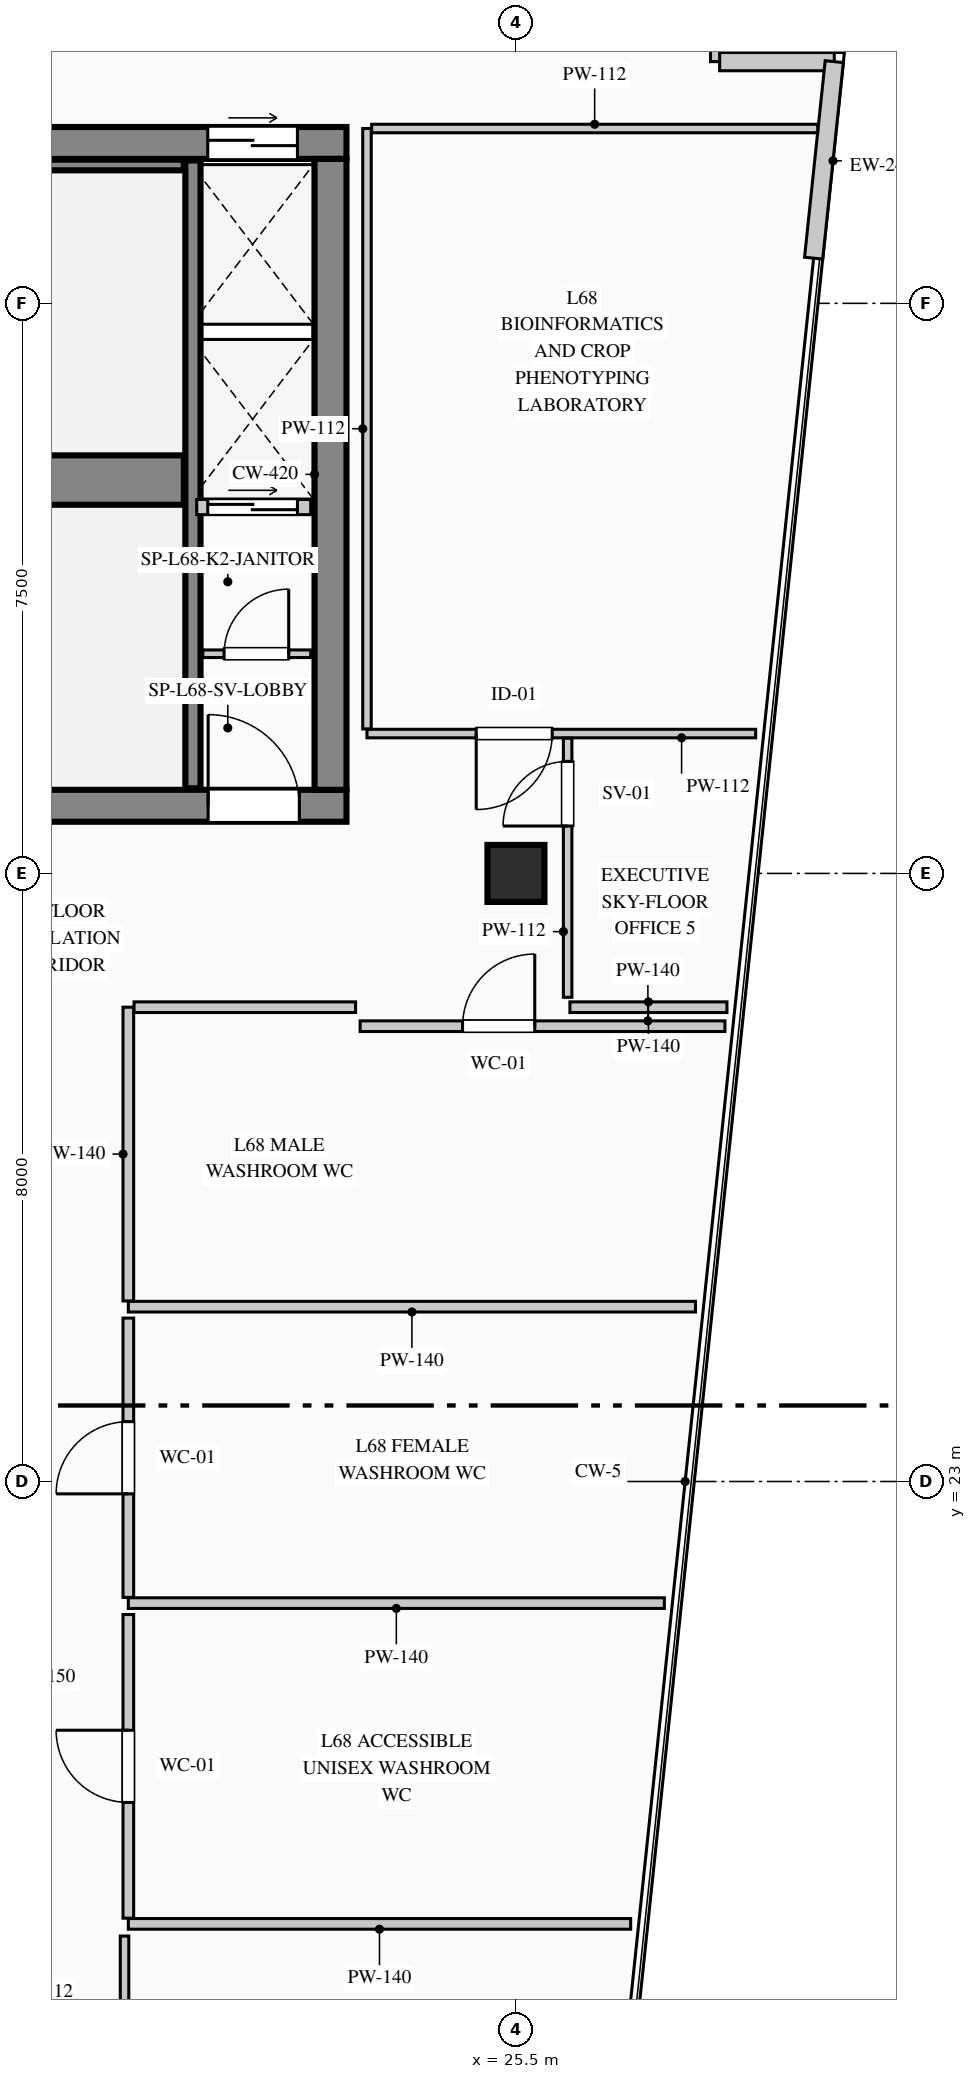
"""IFC4 building model, lengths in metres.
Left out: names, types, materials, properties, quantities, classifications, styles, units other than length and angle.
Written with IfcOpenShell. Run it as: python <this file> out.ifc"""

import sys

from ifc_helpers import new_model, si_unit, direction, frame, frame_2d, origin, origin_2d, place, context, subcontext, project, spatial, rectangle, extrude, element, fill, save


model = new_model("IFC4")
c1 = context("Model", 3, precision=1e-05, world=origin(), true_north=direction((0.0, 1.0)))
c2 = subcontext(c1, "Body", "Model", "MODEL_VIEW")
j1 = project(units=[si_unit("LENGTHUNIT", "METRE"), si_unit("PLANEANGLEUNIT", "RADIAN")], contexts=[c1])
p1 = place(None, origin())
s1 = spatial("IfcSite", under=j1, at=p1, CompositionType="ELEMENT")
p2 = place(p1, origin())
s2 = spatial("IfcBuilding", under=s1, at=p2, CompositionType="ELEMENT")
p3 = place(p2, frame((0.0, 0.0, 284.35)))
s3 = spatial("IfcBuildingStorey", under=s2, at=p3, CompositionType="ELEMENT", Elevation=284.35)
p4 = place(p3, frame((5.58, 40.61, 0.0), z_axis=(0.0, 0.0, 1.0), x_axis=(1.0, 0.0, 0.0)))
e1 = element("IfcWall", 1, at=p4, inside=s3, PredefinedType="SHEAR", context=c2, shape_type="SweptSolid", body=[
    extrude(rectangle(XDim=17.69, YDim=0.42, at=frame_2d((8.845, 0.0))), origin(), (0.0, 0.0, 1.0), 3.95),
])
p5 = place(p4, frame((15.865, 0.0, 0.0)))
e2 = element("IfcOpeningElement", 2, at=p5, cuts=e1, PredefinedType="OPENING", context=c2, shape_type="SweptSolid", body=[
    extrude(rectangle(XDim=1.18, YDim=2.25, at=frame_2d((0.59, 1.125))), frame((0.0, 0.22, 0.0), z_axis=(0.0, -1.0, 0.0), x_axis=(1.0, 0.0, 0.0)), (0.0, 0.0, 1.0), 0.44),
])
p6 = place(p3, frame((5.58, 31.89, 0.0), z_axis=(0.0, 0.0, 1.0), x_axis=(1.0, 0.0, 0.0)))
e3 = element("IfcWall", 3, at=p6, inside=s3, PredefinedType="SHEAR", context=c2, shape_type="SweptSolid", body=[
    extrude(rectangle(XDim=17.69, YDim=0.42, at=frame_2d((8.845, 0.0))), origin(), (0.0, 0.0, 1.0), 3.95),
])
p7 = place(p6, frame((3.07, 0.0, 0.0)))
e4 = element("IfcOpeningElement", 4, at=p7, cuts=e3, PredefinedType="OPENING", context=c2, shape_type="SweptSolid", body=[
    extrude(rectangle(XDim=1.2, YDim=2.2, at=frame_2d((0.6, 1.1))), frame((0.0, 0.22, 0.0), z_axis=(0.0, -1.0, 0.0), x_axis=(1.0, 0.0, 0.0)), (0.0, 0.0, 1.0), 0.44),
])
p8 = place(p6, frame((6.92, 0.0, 0.0)))
e5 = element("IfcOpeningElement", 5, at=p8, cuts=e3, PredefinedType="OPENING", context=c2, shape_type="SweptSolid", body=[
    extrude(rectangle(XDim=1.2, YDim=2.2, at=frame_2d((0.6, 1.1))), frame((0.0, 0.22, 0.0), z_axis=(0.0, -1.0, 0.0), x_axis=(1.0, 0.0, 0.0)), (0.0, 0.0, 1.0), 0.44),
])
p9 = place(p6, frame((8.77, 0.0, 0.0)))
e6 = element("IfcOpeningElement", 6, at=p9, cuts=e3, PredefinedType="OPENING", context=c2, shape_type="SweptSolid", body=[
    extrude(rectangle(XDim=1.15, YDim=2.2, at=frame_2d((0.575, 1.1))), frame((0.0, 0.22, 0.0), z_axis=(0.0, -1.0, 0.0), x_axis=(1.0, 0.0, 0.0)), (0.0, 0.0, 1.0), 0.44),
])
p10 = place(p6, frame((15.87, 0.0, 0.0)))
e7 = element("IfcOpeningElement", 7, at=p10, cuts=e3, PredefinedType="OPENING", context=c2, shape_type="SweptSolid", body=[
    extrude(rectangle(XDim=1.2, YDim=2.2, at=frame_2d((0.6, 1.1))), frame((0.0, 0.22, 0.0), z_axis=(0.0, -1.0, 0.0), x_axis=(1.0, 0.0, 0.0)), (0.0, 0.0, 1.0), 0.44),
])
p11 = place(p3, frame((23.06, 32.1, 0.0), z_axis=(0.0, 0.0, 1.0), x_axis=(0.0, 1.0, 0.0)))
e8 = element("IfcWall", 8, at=p11, inside=s3, PredefinedType="SHEAR", context=c2, shape_type="SweptSolid", body=[
    extrude(rectangle(XDim=8.3, YDim=0.42, at=frame_2d((4.15, 0.0))), origin(), (0.0, 0.0, 1.0), 3.95),
])
p12 = place(p3, frame((14.12, 36.175, 0.0), z_axis=(0.0, 0.0, 1.0), x_axis=(1.0, 0.0, 0.0)))
e9 = element("IfcWall", 9, at=p12, inside=s3, PredefinedType="SHEAR", context=c2, shape_type="SweptSolid", body=[
    extrude(rectangle(XDim=7.01, YDim=0.65, at=frame_2d((3.505, 0.0))), origin(), (0.0, 0.0, 1.0), 3.95),
])
p13 = place(p3, frame((21.25, 32.12, 0.0), z_axis=(0.0, 0.0, 1.0), x_axis=(0.0, 1.0, 0.0)))
e10 = element("IfcWall", 10, at=p13, inside=s3, PredefinedType="SHEAR", context=c2, shape_type="SweptSolid", body=[
    extrude(rectangle(XDim=8.26, YDim=0.2, at=frame_2d((4.13, 0.0))), origin(), (0.0, 0.0, 1.0), 3.95),
])
p14 = place(p3, frame((14.12, 40.32, 0.0), z_axis=(0.0, 0.0, 1.0), x_axis=(1.0, 0.0, 0.0)))
e11 = element("IfcWall", 11, at=p14, inside=s3, PredefinedType="SHEAR", context=c2, shape_type="SweptSolid", body=[
    extrude(rectangle(XDim=7.01, YDim=0.14, at=frame_2d((3.505, 0.0))), origin(), (0.0, 0.0, 1.0), 3.95),
])
p15 = place(p3, frame((25.5, 31.0, 0.0), z_axis=(0.0, 0.0, 1.0), x_axis=(1.0, 0.0, 0.0)))
e12 = element("IfcColumn", 12, at=p15, inside=s3, PredefinedType="COLUMN", context=c2, shape_type="SweptSolid", body=[
    extrude(rectangle(XDim=0.75, YDim=0.75, at=origin_2d()), origin(), (0.0, 0.0, 1.0), 3.95),
])
p16 = place(p3, frame((28.18, 43.38, 0.0), z_axis=(0.0, 0.0, 1.0), x_axis=(0.0, -1.0, 0.0)))
e13 = element("IfcWall", 13, at=p16, inside=s3, PredefinedType="STANDARD", context=c2, shape_type="SweptSolid", body=[
    extrude(rectangle(XDim=1.7, YDim=0.24, at=frame_2d((0.85, 0.0))), origin(), (0.0, 0.0, 1.0), 3.7),
])
p17 = place(p3, frame((28.18, 41.68, 0.0), z_axis=(0.0, 0.0, 1.0), x_axis=(1.0, 0.0, 0.0)))
e14 = element("IfcWall", 14, at=p17, inside=s3, PredefinedType="STANDARD", context=c2, shape_type="SweptSolid", body=[
    extrude(rectangle(XDim=1.508, YDim=0.24, at=frame_2d((0.754, 0.0))), origin(), (0.0, 0.0, 1.0), 3.7),
])
p18 = place(p3, frame((29.688, 41.68, 0.0), z_axis=(0.0, 0.0, 1.0), x_axis=(-0.104420821624, -0.994533203071, 0.0)))
e15 = element("IfcWall", 15, at=p18, inside=s3, PredefinedType="STANDARD", context=c2, shape_type="SweptSolid", body=[
    extrude(rectangle(XDim=2.6, YDim=0.24, at=frame_2d((1.3, 0.0))), origin(), (0.0, 0.0, 1.0), 3.7),
])
p19 = place(p3, frame((21.38, 33.89, 0.0), z_axis=(0.0, 0.0, 1.0), x_axis=(1.0, 0.0, 0.0)))
e16 = element("IfcWall", 16, at=p19, inside=s3, PredefinedType="PARTITIONING", context=c2, shape_type="SweptSolid", body=[
    extrude(rectangle(XDim=1.42, YDim=0.1, at=frame_2d((0.71, 0.0))), origin(), (0.0, 0.0, 1.0), 3.7),
])
p20 = place(p19, frame((0.28, 0.0, 0.0)))
e17 = element("IfcOpeningElement", 17, at=p20, cuts=e16, PredefinedType="OPENING", context=c2, shape_type="SweptSolid", body=[
    extrude(rectangle(XDim=0.85, YDim=2.1, at=frame_2d((0.425, 1.05))), frame((0.0, 0.06, 0.0), z_axis=(0.0, -1.0, 0.0), x_axis=(1.0, 0.0, 0.0)), (0.0, 0.0, 1.0), 0.12),
])
p21 = place(p3, frame((21.3, 35.82, 0.0), z_axis=(0.0, 0.0, 1.0), x_axis=(1.0, 0.0, 0.0)))
e18 = element("IfcWall", 18, at=p21, inside=s3, PredefinedType="PARTITIONING", context=c2, shape_type="SweptSolid", body=[
    extrude(rectangle(XDim=1.5, YDim=0.2, at=frame_2d((0.75, 0.0))), origin(), (0.0, 0.0, 1.0), 3.7),
])
p22 = place(p21, frame((0.145, 0.0, 0.0)))
e19 = element("IfcOpeningElement", 19, at=p22, cuts=e18, PredefinedType="OPENING", context=c2, shape_type="SweptSolid", body=[
    extrude(rectangle(XDim=1.18, YDim=2.25, at=frame_2d((0.59, 1.125))), frame((0.0, 0.11, 0.0), z_axis=(0.0, -1.0, 0.0), x_axis=(1.0, 0.0, 0.0)), (0.0, 0.0, 1.0), 0.22),
])
p23 = place(p3, frame((28.654, 32.84, 0.0), z_axis=(0.0, 0.0, 1.0), x_axis=(-1.0, 0.0, 0.0)))
e20 = element("IfcWall", 20, at=p23, inside=s3, PredefinedType="PARTITIONING", context=c2, shape_type="SweptSolid", body=[
    extrude(rectangle(XDim=5.114, YDim=0.112, at=frame_2d((2.557, 0.0))), origin(), (0.0, 0.0, 1.0), 3.7),
])
p24 = place(p23, frame((2.677, 0.0, 0.0)))
e21 = element("IfcOpeningElement", 21, at=p24, cuts=e20, PredefinedType="OPENING", context=c2, shape_type="SweptSolid", body=[
    extrude(rectangle(XDim=1.0, YDim=2.15, at=frame_2d((0.5, 1.075))), frame((0.0, 0.066, 0.0), z_axis=(0.0, -1.0, 0.0), x_axis=(1.0, 0.0, 0.0)), (0.0, 0.0, 1.0), 0.132),
])
p25 = place(p3, frame((23.54, 32.901, 0.0), z_axis=(0.0, 0.0, 1.0), x_axis=(0.0, 1.0, 0.0)))
e22 = element("IfcWall", 22, at=p25, inside=s3, PredefinedType="PARTITIONING", context=c2, shape_type="SweptSolid", body=[
    extrude(rectangle(XDim=7.899, YDim=0.112, at=frame_2d((3.95, 0.0))), origin(), (0.0, 0.0, 1.0), 3.7),
])
p26 = place(p3, frame((23.601, 40.8, 0.0), z_axis=(0.0, 0.0, 1.0), x_axis=(1.0, 0.0, 0.0)))
e23 = element("IfcWall", 23, at=p26, inside=s3, PredefinedType="PARTITIONING", context=c2, shape_type="SweptSolid", body=[
    extrude(rectangle(XDim=5.869, YDim=0.112, at=frame_2d((2.935, 0.0))), origin(), (0.0, 0.0, 1.0), 3.7),
])
p27 = place(p3, frame((23.45, 28.99, 0.0), z_axis=(0.0, 0.0, 1.0), x_axis=(1.0, 0.0, 0.0)))
e24 = element("IfcWall", 24, at=p27, inside=s3, PredefinedType="PARTITIONING", context=c2, shape_type="SweptSolid", body=[
    extrude(rectangle(XDim=4.8, YDim=0.14, at=frame_2d((2.4, 0.0))), origin(), (0.0, 0.0, 1.0), 3.7),
])
p28 = place(p27, frame((1.347, 0.0, 0.0)))
e25 = element("IfcOpeningElement", 25, at=p28, cuts=e24, PredefinedType="OPENING", context=c2, shape_type="SweptSolid", body=[
    extrude(rectangle(XDim=0.95, YDim=2.15, at=frame_2d((0.475, 1.075))), frame((0.0, 0.08, 0.0), z_axis=(0.0, -1.0, 0.0), x_axis=(1.0, 0.0, 0.0)), (0.0, 0.0, 1.0), 0.16),
])
p29 = place(p3, frame((26.21, 29.24, 0.0), z_axis=(0.0, 0.0, 1.0), x_axis=(1.0, 0.0, 0.0)))
e26 = element("IfcWall", 26, at=p29, inside=s3, PredefinedType="PARTITIONING", context=c2, shape_type="SweptSolid", body=[
    extrude(rectangle(XDim=2.066, YDim=0.14, at=frame_2d((1.033, 0.0))), origin(), (0.0, 0.0, 1.0), 3.7),
])
p30 = place(p3, frame((27.862, 25.3, 0.0), z_axis=(0.0, 0.0, 1.0), x_axis=(-1.0, 0.0, 0.0)))
e27 = element("IfcWall", 27, at=p30, inside=s3, PredefinedType="PARTITIONING", context=c2, shape_type="SweptSolid", body=[
    extrude(rectangle(XDim=7.462, YDim=0.14, at=frame_2d((3.731, 0.0))), origin(), (0.0, 0.0, 1.0), 3.7),
])
p31 = place(p3, frame((20.4, 25.375, 0.0), z_axis=(0.0, 0.0, 1.0), x_axis=(0.0, 1.0, 0.0)))
e28 = element("IfcWall", 28, at=p31, inside=s3, PredefinedType="PARTITIONING", context=c2, shape_type="SweptSolid", body=[
    extrude(rectangle(XDim=3.865, YDim=0.14, at=frame_2d((1.933, 0.0))), origin(), (0.0, 0.0, 1.0), 3.7),
])
p32 = place(p3, frame((20.475, 29.24, 0.0), z_axis=(0.0, 0.0, 1.0), x_axis=(1.0, 0.0, 0.0)))
e29 = element("IfcWall", 29, at=p32, inside=s3, PredefinedType="PARTITIONING", context=c2, shape_type="SweptSolid", body=[
    extrude(rectangle(XDim=2.915, YDim=0.14, at=frame_2d((1.458, 0.0))), origin(), (0.0, 0.0, 1.0), 3.7),
])
p33 = place(p3, frame((27.452, 21.4, 0.0), z_axis=(0.0, 0.0, 1.0), x_axis=(-1.0, 0.0, 0.0)))
e30 = element("IfcWall", 30, at=p33, inside=s3, PredefinedType="PARTITIONING", context=c2, shape_type="SweptSolid", body=[
    extrude(rectangle(XDim=7.052, YDim=0.14, at=frame_2d((3.526, 0.0))), origin(), (0.0, 0.0, 1.0), 3.7),
])
p34 = place(p3, frame((20.4, 21.475, 0.0), z_axis=(0.0, 0.0, 1.0), x_axis=(0.0, 1.0, 0.0)))
e31 = element("IfcWall", 31, at=p34, inside=s3, PredefinedType="PARTITIONING", context=c2, shape_type="SweptSolid", body=[
    extrude(rectangle(XDim=3.675, YDim=0.14, at=frame_2d((1.837, 0.0))), origin(), (0.0, 0.0, 1.0), 3.7),
])
p35 = place(p34, frame((1.363, 0.0, 0.0)))
e32 = element("IfcOpeningElement", 32, at=p35, cuts=e31, PredefinedType="OPENING", context=c2, shape_type="SweptSolid", body=[
    extrude(rectangle(XDim=0.95, YDim=2.15, at=frame_2d((0.475, 1.075))), frame((0.0, 0.08, 0.0), z_axis=(0.0, -1.0, 0.0), x_axis=(1.0, 0.0, 0.0)), (0.0, 0.0, 1.0), 0.16),
])
p36 = place(p3, frame((27.009, 17.18, 0.0), z_axis=(0.0, 0.0, 1.0), x_axis=(-1.0, 0.0, 0.0)))
e33 = element("IfcWall", 33, at=p36, inside=s3, PredefinedType="PARTITIONING", context=c2, shape_type="SweptSolid", body=[
    extrude(rectangle(XDim=6.609, YDim=0.14, at=frame_2d((3.305, 0.0))), origin(), (0.0, 0.0, 1.0), 3.7),
])
p37 = place(p3, frame((20.4, 17.255, 0.0), z_axis=(0.0, 0.0, 1.0), x_axis=(0.0, 1.0, 0.0)))
e34 = element("IfcWall", 34, at=p37, inside=s3, PredefinedType="PARTITIONING", context=c2, shape_type="SweptSolid", body=[
    extrude(rectangle(XDim=3.995, YDim=0.14, at=frame_2d((1.998, 0.0))), origin(), (0.0, 0.0, 1.0), 3.7),
])
p38 = place(p37, frame((1.522, 0.0, 0.0)))
e35 = element("IfcOpeningElement", 35, at=p38, cuts=e34, PredefinedType="OPENING", context=c2, shape_type="SweptSolid", body=[
    extrude(rectangle(XDim=0.95, YDim=2.15, at=frame_2d((0.475, 1.075))), frame((0.0, 0.08, 0.0), z_axis=(0.0, -1.0, 0.0), x_axis=(1.0, 0.0, 0.0)), (0.0, 0.0, 1.0), 0.16),
])
p39 = place(p3, frame((20.35, 13.44, 0.0), z_axis=(0.0, 0.0, 1.0), x_axis=(0.0, 1.0, 0.0)))
e36 = element("IfcWall", 36, at=p39, inside=s3, PredefinedType="PARTITIONING", context=c2, shape_type="SweptSolid", body=[
    extrude(rectangle(XDim=3.58, YDim=0.112, at=frame_2d((1.79, 0.0))), origin(), (0.0, 0.0, 1.0), 3.7),
])
p40 = place(p39, frame((1.29, 0.0, 0.0)))
e37 = element("IfcOpeningElement", 37, at=p40, cuts=e36, PredefinedType="OPENING", context=c2, shape_type="SweptSolid", body=[
    extrude(rectangle(XDim=1.0, YDim=2.15, at=frame_2d((0.5, 1.075))), frame((0.0, 0.066, 0.0), z_axis=(0.0, -1.0, 0.0), x_axis=(1.0, 0.0, 0.0)), (0.0, 0.0, 1.0), 0.132),
])
p41 = place(p3, frame((26.18, 29.37, 0.0), z_axis=(0.0, 0.0, 1.0), x_axis=(0.0, 1.0, 0.0)))
e38 = element("IfcWall", 38, at=p41, inside=s3, PredefinedType="PARTITIONING", context=c2, shape_type="SweptSolid", body=[
    extrude(rectangle(XDim=3.409, YDim=0.112, at=frame_2d((1.705, 0.0))), origin(), (0.0, 0.0, 1.0), 3.7),
])
p42 = place(p41, frame((2.253, 0.0, 0.0)))
e39 = element("IfcOpeningElement", 39, at=p42, cuts=e38, PredefinedType="OPENING", context=c2, shape_type="SweptSolid", body=[
    extrude(rectangle(XDim=0.85, YDim=2.1, at=frame_2d((0.425, 1.05))), frame((0.0, 0.066, 0.0), z_axis=(0.0, -1.0, 0.0), x_axis=(1.0, 0.0, 0.0)), (0.0, 0.0, 1.0), 0.132),
])
p43 = place(p10, origin())
e40 = element("IfcDoor", 40, at=p43, inside=s3, OperationType="SINGLE_SWING_LEFT", PredefinedType="DOOR", context=c2, shape_type="SweptSolid", body=[
    extrude(rectangle(XDim=1.2, YDim=2.2, at=frame_2d((0.6, 1.1))), frame((0.0, 0.025, 0.0), z_axis=(0.0, -1.0, 0.0), x_axis=(1.0, 0.0, 0.0)), (0.0, 0.0, 1.0), 0.05),
])
fill(e7, e40)
p44 = place(p20, origin())
e41 = element("IfcDoor", 41, at=p44, inside=s3, OperationType="SINGLE_SWING_RIGHT", PredefinedType="DOOR", context=c2, shape_type="SweptSolid", body=[
    extrude(rectangle(XDim=0.85, YDim=2.1, at=frame_2d((0.425, 1.05))), frame((0.0, 0.025, 0.0), z_axis=(0.0, -1.0, 0.0), x_axis=(1.0, 0.0, 0.0)), (0.0, 0.0, 1.0), 0.05),
])
fill(e17, e41)
p45 = place(p5, origin())
e42 = element("IfcDoor", 42, at=p45, inside=s3, OperationType="DOUBLE_DOOR_SLIDING", PredefinedType="DOOR", context=c2, shape_type="SweptSolid", body=[
    extrude(rectangle(XDim=1.18, YDim=2.25, at=frame_2d((0.59, 1.125))), frame((0.0, 0.025, 0.0), z_axis=(0.0, -1.0, 0.0), x_axis=(1.0, 0.0, 0.0)), (0.0, 0.0, 1.0), 0.05),
])
fill(e2, e42)
p46 = place(p22, origin())
e43 = element("IfcDoor", 43, at=p46, inside=s3, OperationType="DOUBLE_DOOR_SLIDING", PredefinedType="DOOR", context=c2, shape_type="SweptSolid", body=[
    extrude(rectangle(XDim=1.18, YDim=2.25, at=frame_2d((0.59, 1.125))), frame((0.0, 0.025, 0.0), z_axis=(0.0, -1.0, 0.0), x_axis=(1.0, 0.0, 0.0)), (0.0, 0.0, 1.0), 0.05),
])
fill(e19, e43)
p47 = place(p24, origin())
e44 = element("IfcDoor", 44, at=p47, inside=s3, OperationType="SINGLE_SWING_RIGHT", PredefinedType="DOOR", context=c2, shape_type="SweptSolid", body=[
    extrude(rectangle(XDim=1.0, YDim=2.15, at=frame_2d((0.5, 1.075))), frame((0.0, 0.025, 0.0), z_axis=(0.0, -1.0, 0.0), x_axis=(1.0, 0.0, 0.0)), (0.0, 0.0, 1.0), 0.05),
])
fill(e21, e44)
p48 = place(p28, origin())
e45 = element("IfcDoor", 45, at=p48, inside=s3, OperationType="SINGLE_SWING_RIGHT", PredefinedType="DOOR", context=c2, shape_type="SweptSolid", body=[
    extrude(rectangle(XDim=0.95, YDim=2.15, at=frame_2d((0.475, 1.075))), frame((0.0, 0.025, 0.0), z_axis=(0.0, -1.0, 0.0), x_axis=(1.0, 0.0, 0.0)), (0.0, 0.0, 1.0), 0.05),
])
fill(e25, e45)
p49 = place(p35, origin())
e46 = element("IfcDoor", 46, at=p49, inside=s3, OperationType="SINGLE_SWING_LEFT", PredefinedType="DOOR", context=c2, shape_type="SweptSolid", body=[
    extrude(rectangle(XDim=0.95, YDim=2.15, at=frame_2d((0.475, 1.075))), frame((0.0, 0.025, 0.0), z_axis=(0.0, -1.0, 0.0), x_axis=(1.0, 0.0, 0.0)), (0.0, 0.0, 1.0), 0.05),
])
fill(e32, e46)
p50 = place(p38, origin())
e47 = element("IfcDoor", 47, at=p50, inside=s3, OperationType="SINGLE_SWING_RIGHT", PredefinedType="DOOR", context=c2, shape_type="SweptSolid", body=[
    extrude(rectangle(XDim=0.95, YDim=2.15, at=frame_2d((0.475, 1.075))), frame((0.0, 0.025, 0.0), z_axis=(0.0, -1.0, 0.0), x_axis=(1.0, 0.0, 0.0)), (0.0, 0.0, 1.0), 0.05),
])
fill(e35, e47)
p51 = place(p42, origin())
e48 = element("IfcDoor", 48, at=p51, inside=s3, OperationType="SINGLE_SWING_LEFT", PredefinedType="DOOR", context=c2, shape_type="SweptSolid", body=[
    extrude(rectangle(XDim=0.85, YDim=2.1, at=frame_2d((0.425, 1.05))), frame((0.0, 0.025, 0.0), z_axis=(0.0, -1.0, 0.0), x_axis=(1.0, 0.0, 0.0)), (0.0, 0.0, 1.0), 0.05),
])
fill(e39, e48)
save(model, sys.argv[1])
